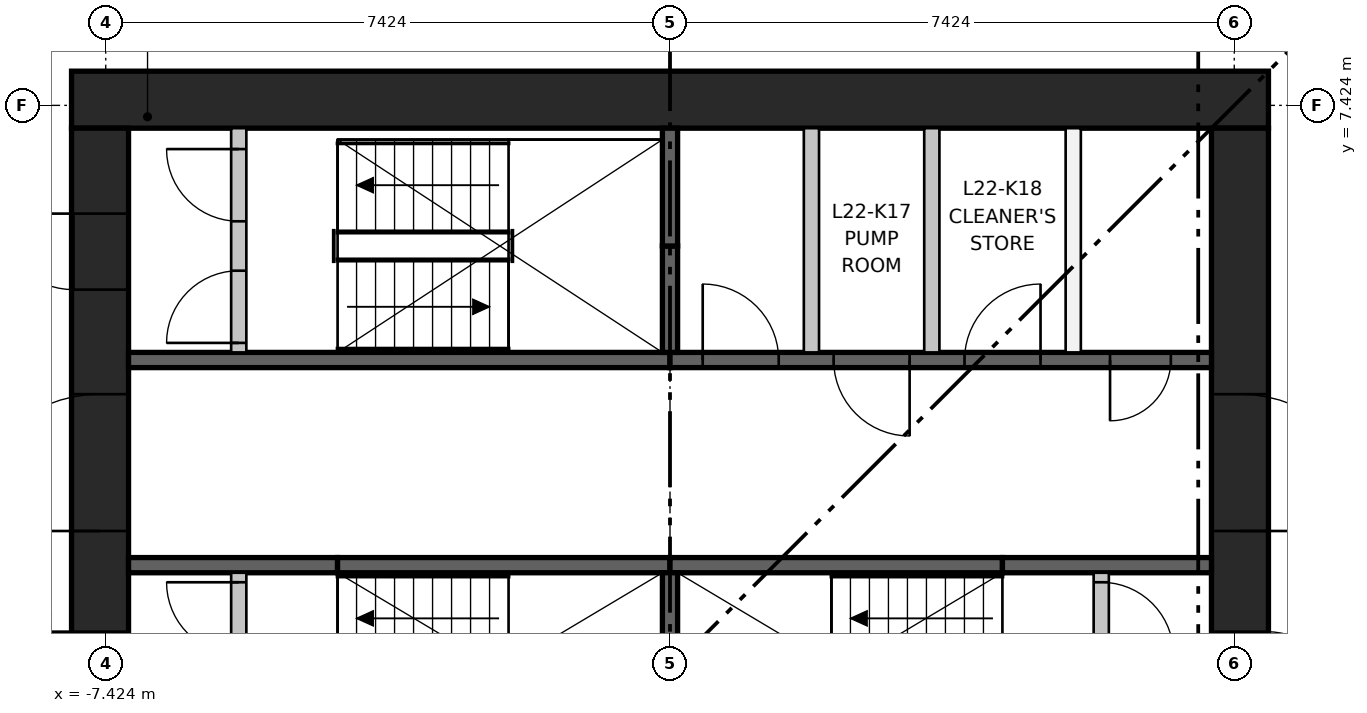
"""IFC4 building model, lengths in metres.
Left out: names, types, materials, properties, quantities, classifications, styles, units other than length and angle.
Written with IfcOpenShell. Run it as: python <this file> out.ifc"""

import sys

from ifc_helpers import new_model, si_unit, direction, frame, frame_2d, origin, place, context, subcontext, project, spatial, rectangle, extrude, element, fill, save


model = new_model("IFC4")
c1 = context("Model", 3, precision=1e-05, world=origin(), true_north=direction((0.0, 1.0)))
c2 = subcontext(c1, "Body", "Model", "MODEL_VIEW")
j1 = project(units=[si_unit("LENGTHUNIT", "METRE"), si_unit("PLANEANGLEUNIT", "RADIAN")], contexts=[c1])
p1 = place(None, origin())
s1 = spatial("IfcSite", under=j1, at=p1, CompositionType="ELEMENT")
p2 = place(p1, origin())
s2 = spatial("IfcBuilding", under=s1, at=p2, CompositionType="ELEMENT")
p3 = place(p2, frame((0.0, 0.0, 87.35)))
s3 = spatial("IfcBuildingStorey", under=s2, at=p3, CompositionType="ELEMENT", Elevation=87.35)
p4 = place(p3, frame((-7.874, 7.499, 0.0), z_axis=(0.0, 0.0, 1.0), x_axis=(1.0, 0.0, 0.0)))
e1 = element("IfcWall", 1, at=p4, inside=s3, PredefinedType="SHEAR", context=c2, shape_type="SweptSolid", body=[
    extrude(rectangle(XDim=15.748, YDim=0.75, at=frame_2d((7.874, 0.0))), origin(), (0.0, 0.0, 1.0), 3.65),
])
p5 = place(p3, frame((-7.499, -7.124, 0.0), z_axis=(0.0, 0.0, 1.0), x_axis=(0.0, 1.0, 0.0)))
e2 = element("IfcWall", 2, at=p5, inside=s3, PredefinedType="SHEAR", context=c2, shape_type="SweptSolid", body=[
    extrude(rectangle(XDim=14.248, YDim=0.75, at=frame_2d((7.124, 0.0))), origin(), (0.0, 0.0, 1.0), 3.65),
])
p6 = place(p5, frame((6.624, 0.0, 0.0)))
e3 = element("IfcOpeningElement", 3, at=p6, cuts=e2, PredefinedType="OPENING", context=c2, shape_type="SweptSolid", body=[
    extrude(rectangle(XDim=1.0, YDim=2.1, at=frame_2d((0.5, 1.05))), frame((0.0, 0.385, 0.0), z_axis=(0.0, -1.0, 0.0), x_axis=(1.0, 0.0, 0.0)), (0.0, 0.0, 1.0), 0.77),
])
p7 = place(p5, frame((3.5, 0.0, 0.0)))
e4 = element("IfcOpeningElement", 4, at=p7, cuts=e2, PredefinedType="OPENING", context=c2, shape_type="SweptSolid", body=[
    extrude(rectangle(XDim=1.8, YDim=2.1, at=frame_2d((0.9, 1.05))), frame((0.0, 0.385, 0.0), z_axis=(0.0, -1.0, 0.0), x_axis=(1.0, 0.0, 0.0)), (0.0, 0.0, 1.0), 0.77),
])
p8 = place(p5, frame((8.948, 0.0, 0.0)))
e5 = element("IfcOpeningElement", 5, at=p8, cuts=e2, PredefinedType="OPENING", context=c2, shape_type="SweptSolid", body=[
    extrude(rectangle(XDim=1.8, YDim=2.1, at=frame_2d((0.9, 1.05))), frame((0.0, 0.385, 0.0), z_axis=(0.0, -1.0, 0.0), x_axis=(1.0, 0.0, 0.0)), (0.0, 0.0, 1.0), 0.77),
])
p9 = place(p5, frame((12.124, 0.0, 0.0)))
e6 = element("IfcOpeningElement", 6, at=p9, cuts=e2, PredefinedType="OPENING", context=c2, shape_type="SweptSolid", body=[
    extrude(rectangle(XDim=1.0, YDim=2.1, at=frame_2d((0.5, 1.05))), frame((0.0, 0.385, 0.0), z_axis=(0.0, -1.0, 0.0), x_axis=(1.0, 0.0, 0.0)), (0.0, 0.0, 1.0), 0.77),
])
p10 = place(p3, frame((7.499, -7.124, 0.0), z_axis=(0.0, 0.0, 1.0), x_axis=(0.0, 1.0, 0.0)))
e7 = element("IfcWall", 7, at=p10, inside=s3, PredefinedType="SHEAR", context=c2, shape_type="SweptSolid", body=[
    extrude(rectangle(XDim=14.248, YDim=0.75, at=frame_2d((7.124, 0.0))), origin(), (0.0, 0.0, 1.0), 3.65),
])
p11 = place(p10, frame((6.624, 0.0, 0.0)))
e8 = element("IfcOpeningElement", 8, at=p11, cuts=e7, PredefinedType="OPENING", context=c2, shape_type="SweptSolid", body=[
    extrude(rectangle(XDim=1.0, YDim=2.1, at=frame_2d((0.5, 1.05))), frame((0.0, 0.385, 0.0), z_axis=(0.0, -1.0, 0.0), x_axis=(1.0, 0.0, 0.0)), (0.0, 0.0, 1.0), 0.77),
])
p12 = place(p10, frame((3.5, 0.0, 0.0)))
e9 = element("IfcOpeningElement", 9, at=p12, cuts=e7, PredefinedType="OPENING", context=c2, shape_type="SweptSolid", body=[
    extrude(rectangle(XDim=1.8, YDim=2.1, at=frame_2d((0.9, 1.05))), frame((0.0, 0.385, 0.0), z_axis=(0.0, -1.0, 0.0), x_axis=(1.0, 0.0, 0.0)), (0.0, 0.0, 1.0), 0.77),
])
p13 = place(p10, frame((8.948, 0.0, 0.0)))
e10 = element("IfcOpeningElement", 10, at=p13, cuts=e7, PredefinedType="OPENING", context=c2, shape_type="SweptSolid", body=[
    extrude(rectangle(XDim=1.8, YDim=2.1, at=frame_2d((0.9, 1.05))), frame((0.0, 0.385, 0.0), z_axis=(0.0, -1.0, 0.0), x_axis=(1.0, 0.0, 0.0)), (0.0, 0.0, 1.0), 0.77),
])
p14 = place(p3, frame((-7.124, 4.074, 0.0), z_axis=(0.0, 0.0, 1.0), x_axis=(1.0, 0.0, 0.0)))
e11 = element("IfcWall", 11, at=p14, inside=s3, PredefinedType="SHEAR", context=c2, shape_type="SweptSolid", body=[
    extrude(rectangle(XDim=7.124, YDim=0.2, at=frame_2d((3.562, 0.0))), origin(), (0.0, 0.0, 1.0), 3.3),
])
p15 = place(p3, frame((0.0, 4.074, 0.0), z_axis=(0.0, 0.0, 1.0), x_axis=(1.0, 0.0, 0.0)))
e12 = element("IfcWall", 12, at=p15, inside=s3, PredefinedType="SHEAR", context=c2, shape_type="SweptSolid", body=[
    extrude(rectangle(XDim=7.124, YDim=0.2, at=frame_2d((3.562, 0.0))), origin(), (0.0, 0.0, 1.0), 3.3),
])
p16 = place(p15, frame((0.43, 0.0, 0.0)))
e13 = element("IfcOpeningElement", 13, at=p16, cuts=e12, PredefinedType="OPENING", context=c2, shape_type="SweptSolid", body=[
    extrude(rectangle(XDim=1.0, YDim=2.1, at=frame_2d((0.5, 1.05))), frame((0.0, 0.11, 0.0), z_axis=(0.0, -1.0, 0.0), x_axis=(1.0, 0.0, 0.0)), (0.0, 0.0, 1.0), 0.22),
])
p17 = place(p15, frame((2.153, 0.0, 0.0)))
e14 = element("IfcOpeningElement", 14, at=p17, cuts=e12, PredefinedType="OPENING", context=c2, shape_type="SweptSolid", body=[
    extrude(rectangle(XDim=1.0, YDim=2.1, at=frame_2d((0.5, 1.05))), frame((0.0, 0.11, 0.0), z_axis=(0.0, -1.0, 0.0), x_axis=(1.0, 0.0, 0.0)), (0.0, 0.0, 1.0), 0.22),
])
p18 = place(p15, frame((3.875, 0.0, 0.0)))
e15 = element("IfcOpeningElement", 15, at=p18, cuts=e12, PredefinedType="OPENING", context=c2, shape_type="SweptSolid", body=[
    extrude(rectangle(XDim=1.0, YDim=2.1, at=frame_2d((0.5, 1.05))), frame((0.0, 0.11, 0.0), z_axis=(0.0, -1.0, 0.0), x_axis=(1.0, 0.0, 0.0)), (0.0, 0.0, 1.0), 0.22),
])
p19 = place(p15, frame((5.79, 0.0, 0.0)))
e16 = element("IfcOpeningElement", 16, at=p19, cuts=e12, PredefinedType="OPENING", context=c2, shape_type="SweptSolid", body=[
    extrude(rectangle(XDim=0.8, YDim=2.1, at=frame_2d((0.4, 1.05))), frame((0.0, 0.11, 0.0), z_axis=(0.0, -1.0, 0.0), x_axis=(1.0, 0.0, 0.0)), (0.0, 0.0, 1.0), 0.22),
])
p20 = place(p3, frame((-7.124, 1.375, 0.0), z_axis=(0.0, 0.0, 1.0), x_axis=(1.0, 0.0, 0.0)))
e17 = element("IfcWall", 17, at=p20, inside=s3, PredefinedType="SHEAR", context=c2, shape_type="SweptSolid", body=[
    extrude(rectangle(XDim=2.75, YDim=0.2, at=frame_2d((1.375, 0.0))), origin(), (0.0, 0.0, 1.0), 3.3),
])
for number, where, z_axis, x_axis in (
    (18, (-4.374, 1.375, 0.0), (0.0, 0.0, 1.0), (1.0, 0.0, 0.0)),
    (19, (0.0, 1.375, 0.0), (0.0, 0.0, 1.0), (1.0, 0.0, 0.0)),
):
    element("IfcWall", number, at=place(p3, frame(where, z_axis=z_axis, x_axis=x_axis)), inside=s3, PredefinedType="SHEAR", context=c2, shape_type="SweptSolid", body=[
        extrude(rectangle(XDim=4.374, YDim=0.2, at=frame_2d((2.187, 0.0))), origin(), (0.0, 0.0, 1.0), 3.3),
    ])
p21 = place(p3, frame((4.374, 1.375, 0.0), z_axis=(0.0, 0.0, 1.0), x_axis=(1.0, 0.0, 0.0)))
e20 = element("IfcWall", 20, at=p21, inside=s3, PredefinedType="SHEAR", context=c2, shape_type="SweptSolid", body=[
    extrude(rectangle(XDim=2.75, YDim=0.2, at=frame_2d((1.375, 0.0))), origin(), (0.0, 0.0, 1.0), 3.3),
])
p22 = place(p3, frame((0.0, -1.275, 0.0), z_axis=(0.0, 0.0, 1.0), x_axis=(0.0, 1.0, 0.0)))
e21 = element("IfcWall", 21, at=p22, inside=s3, PredefinedType="SHEAR", context=c2, shape_type="SweptSolid", body=[
    extrude(rectangle(XDim=2.55, YDim=0.2, at=frame_2d((1.275, 0.0))), origin(), (0.0, 0.0, 1.0), 3.3),
])
p23 = place(p3, frame((0.0, 4.174, 0.0), z_axis=(0.0, 0.0, 1.0), x_axis=(0.0, 1.0, 0.0)))
e22 = element("IfcWall", 22, at=p23, inside=s3, PredefinedType="SHEAR", context=c2, shape_type="SweptSolid", body=[
    extrude(rectangle(XDim=1.4, YDim=0.2, at=frame_2d((0.7, 0.0))), origin(), (0.0, 0.0, 1.0), 3.3),
])
p24 = place(p3, frame((0.0, 5.574, 0.0), z_axis=(0.0, 0.0, 1.0), x_axis=(0.0, 1.0, 0.0)))
e23 = element("IfcWall", 23, at=p24, inside=s3, PredefinedType="SHEAR", context=c2, shape_type="SweptSolid", body=[
    extrude(rectangle(XDim=1.55, YDim=0.2, at=frame_2d((0.775, 0.0))), origin(), (0.0, 0.0, 1.0), 3.3),
])
for number, where, z_axis, x_axis in (
    (24, (1.861, 4.174, 0.0), (0.0, 0.0, 1.0), (0.0, 1.0, 0.0)),
    (25, (3.445, 4.174, 0.0), (0.0, 0.0, 1.0), (0.0, 1.0, 0.0)),
    (26, (5.305, 4.174, 0.0), (0.0, 0.0, 1.0), (0.0, 1.0, 0.0)),
):
    element("IfcWall", number, at=place(p3, frame(where, z_axis=z_axis, x_axis=x_axis)), inside=s3, PredefinedType="PARTITIONING", context=c2, shape_type="SweptSolid", body=[
        extrude(rectangle(XDim=2.95, YDim=0.2, at=frame_2d((1.475, 0.0))), origin(), (0.0, 0.0, 1.0), 3.3),
    ])
p25 = place(p3, frame((-5.674, -1.275, 0.0), z_axis=(0.0, 0.0, 1.0), x_axis=(0.0, 1.0, 0.0)))
e27 = element("IfcWall", 27, at=p25, inside=s3, PredefinedType="PARTITIONING", context=c2, shape_type="SweptSolid", body=[
    extrude(rectangle(XDim=2.55, YDim=0.2, at=frame_2d((1.275, 0.0))), origin(), (0.0, 0.0, 1.0), 3.3),
])
p26 = place(p25, frame((0.125, 0.0, 0.0)))
e28 = element("IfcOpeningElement", 28, at=p26, cuts=e27, PredefinedType="OPENING", context=c2, shape_type="SweptSolid", body=[
    extrude(rectangle(XDim=0.95, YDim=2.1, at=frame_2d((0.475, 1.05))), frame((0.0, 0.11, 0.0), z_axis=(0.0, -1.0, 0.0), x_axis=(1.0, 0.0, 0.0)), (0.0, 0.0, 1.0), 0.22),
])
p27 = place(p25, frame((1.475, 0.0, 0.0)))
e29 = element("IfcOpeningElement", 29, at=p27, cuts=e27, PredefinedType="OPENING", context=c2, shape_type="SweptSolid", body=[
    extrude(rectangle(XDim=0.95, YDim=2.1, at=frame_2d((0.475, 1.05))), frame((0.0, 0.11, 0.0), z_axis=(0.0, -1.0, 0.0), x_axis=(1.0, 0.0, 0.0)), (0.0, 0.0, 1.0), 0.22),
])
p28 = place(p3, frame((5.674, -1.275, 0.0), z_axis=(0.0, 0.0, 1.0), x_axis=(0.0, 1.0, 0.0)))
e30 = element("IfcWall", 30, at=p28, inside=s3, PredefinedType="PARTITIONING", context=c2, shape_type="SweptSolid", body=[
    extrude(rectangle(XDim=2.55, YDim=0.2, at=frame_2d((1.275, 0.0))), origin(), (0.0, 0.0, 1.0), 3.3),
])
p29 = place(p28, frame((0.125, 0.0, 0.0)))
e31 = element("IfcOpeningElement", 31, at=p29, cuts=e30, PredefinedType="OPENING", context=c2, shape_type="SweptSolid", body=[
    extrude(rectangle(XDim=0.95, YDim=2.1, at=frame_2d((0.475, 1.05))), frame((0.0, 0.11, 0.0), z_axis=(0.0, -1.0, 0.0), x_axis=(1.0, 0.0, 0.0)), (0.0, 0.0, 1.0), 0.22),
])
p30 = place(p28, frame((1.475, 0.0, 0.0)))
e32 = element("IfcOpeningElement", 32, at=p30, cuts=e30, PredefinedType="OPENING", context=c2, shape_type="SweptSolid", body=[
    extrude(rectangle(XDim=0.95, YDim=2.1, at=frame_2d((0.475, 1.05))), frame((0.0, 0.11, 0.0), z_axis=(0.0, -1.0, 0.0), x_axis=(1.0, 0.0, 0.0)), (0.0, 0.0, 1.0), 0.22),
])
p31 = place(p3, frame((-5.674, 4.174, 0.0), z_axis=(0.0, 0.0, 1.0), x_axis=(0.0, 1.0, 0.0)))
e33 = element("IfcWall", 33, at=p31, inside=s3, PredefinedType="PARTITIONING", context=c2, shape_type="SweptSolid", body=[
    extrude(rectangle(XDim=2.95, YDim=0.2, at=frame_2d((1.475, 0.0))), origin(), (0.0, 0.0, 1.0), 3.3),
])
p32 = place(p31, frame((0.125, 0.0, 0.0)))
e34 = element("IfcOpeningElement", 34, at=p32, cuts=e33, PredefinedType="OPENING", context=c2, shape_type="SweptSolid", body=[
    extrude(rectangle(XDim=0.95, YDim=2.1, at=frame_2d((0.475, 1.05))), frame((0.0, 0.11, 0.0), z_axis=(0.0, -1.0, 0.0), x_axis=(1.0, 0.0, 0.0)), (0.0, 0.0, 1.0), 0.22),
])
p33 = place(p31, frame((1.725, 0.0, 0.0)))
e35 = element("IfcOpeningElement", 35, at=p33, cuts=e33, PredefinedType="OPENING", context=c2, shape_type="SweptSolid", body=[
    extrude(rectangle(XDim=0.95, YDim=2.1, at=frame_2d((0.475, 1.05))), frame((0.0, 0.11, 0.0), z_axis=(0.0, -1.0, 0.0), x_axis=(1.0, 0.0, 0.0)), (0.0, 0.0, 1.0), 0.22),
])
p34 = place(p27, origin())
e36 = element("IfcDoor", 36, at=p34, inside=s3, OperationType="SINGLE_SWING_RIGHT", PredefinedType="DOOR", context=c2, shape_type="SweptSolid", body=[
    extrude(rectangle(XDim=0.95, YDim=2.1, at=frame_2d((0.475, 1.05))), frame((0.0, 0.025, 0.0), z_axis=(0.0, -1.0, 0.0), x_axis=(1.0, 0.0, 0.0)), (0.0, 0.0, 1.0), 0.05),
])
fill(e29, e36)
p35 = place(p30, frame((0.95, 0.0, 0.0), z_axis=(0.0, 0.0, 1.0), x_axis=(-1.0, 0.0, 0.0)))
e37 = element("IfcDoor", 37, at=p35, inside=s3, OperationType="SINGLE_SWING_LEFT", PredefinedType="DOOR", context=c2, shape_type="SweptSolid", body=[
    extrude(rectangle(XDim=0.95, YDim=2.1, at=frame_2d((0.475, 1.05))), frame((0.0, 0.025, 0.0), z_axis=(0.0, -1.0, 0.0), x_axis=(1.0, 0.0, 0.0)), (0.0, 0.0, 1.0), 0.05),
])
fill(e32, e37)
p36 = place(p32, origin())
e38 = element("IfcDoor", 38, at=p36, inside=s3, OperationType="SINGLE_SWING_LEFT", PredefinedType="DOOR", context=c2, shape_type="SweptSolid", body=[
    extrude(rectangle(XDim=0.95, YDim=2.1, at=frame_2d((0.475, 1.05))), frame((0.0, 0.025, 0.0), z_axis=(0.0, -1.0, 0.0), x_axis=(1.0, 0.0, 0.0)), (0.0, 0.0, 1.0), 0.05),
])
fill(e34, e38)
p37 = place(p33, origin())
e39 = element("IfcDoor", 39, at=p37, inside=s3, OperationType="SINGLE_SWING_RIGHT", PredefinedType="DOOR", context=c2, shape_type="SweptSolid", body=[
    extrude(rectangle(XDim=0.95, YDim=2.1, at=frame_2d((0.475, 1.05))), frame((0.0, 0.025, 0.0), z_axis=(0.0, -1.0, 0.0), x_axis=(1.0, 0.0, 0.0)), (0.0, 0.0, 1.0), 0.05),
])
fill(e35, e39)
p38 = place(p16, origin())
e40 = element("IfcDoor", 40, at=p38, inside=s3, OperationType="SINGLE_SWING_LEFT", PredefinedType="DOOR", context=c2, shape_type="SweptSolid", body=[
    extrude(rectangle(XDim=1.0, YDim=2.1, at=frame_2d((0.5, 1.05))), frame((0.0, 0.025, 0.0), z_axis=(0.0, -1.0, 0.0), x_axis=(1.0, 0.0, 0.0)), (0.0, 0.0, 1.0), 0.05),
])
fill(e13, e40)
p39 = place(p17, frame((1.0, 0.0, 0.0), z_axis=(0.0, 0.0, 1.0), x_axis=(-1.0, 0.0, 0.0)))
e41 = element("IfcDoor", 41, at=p39, inside=s3, OperationType="SINGLE_SWING_RIGHT", PredefinedType="DOOR", context=c2, shape_type="SweptSolid", body=[
    extrude(rectangle(XDim=1.0, YDim=2.1, at=frame_2d((0.5, 1.05))), frame((0.0, 0.025, 0.0), z_axis=(0.0, -1.0, 0.0), x_axis=(1.0, 0.0, 0.0)), (0.0, 0.0, 1.0), 0.05),
])
fill(e14, e41)
p40 = place(p18, origin())
e42 = element("IfcDoor", 42, at=p40, inside=s3, OperationType="SINGLE_SWING_RIGHT", PredefinedType="DOOR", context=c2, shape_type="SweptSolid", body=[
    extrude(rectangle(XDim=1.0, YDim=2.1, at=frame_2d((0.5, 1.05))), frame((0.0, 0.025, 0.0), z_axis=(0.0, -1.0, 0.0), x_axis=(1.0, 0.0, 0.0)), (0.0, 0.0, 1.0), 0.05),
])
fill(e15, e42)
p41 = place(p19, frame((0.8, 0.0, 0.0), z_axis=(0.0, 0.0, 1.0), x_axis=(-1.0, 0.0, 0.0)))
e43 = element("IfcDoor", 43, at=p41, inside=s3, OperationType="SINGLE_SWING_LEFT", PredefinedType="DOOR", context=c2, shape_type="SweptSolid", body=[
    extrude(rectangle(XDim=0.8, YDim=2.1, at=frame_2d((0.4, 1.05))), frame((0.0, 0.025, 0.0), z_axis=(0.0, -1.0, 0.0), x_axis=(1.0, 0.0, 0.0)), (0.0, 0.0, 1.0), 0.05),
])
fill(e16, e43)
p42 = place(p6, origin())
e44 = element("IfcDoor", 44, at=p42, inside=s3, OperationType="SINGLE_SWING_RIGHT", PredefinedType="DOOR", context=c2, shape_type="SweptSolid", body=[
    extrude(rectangle(XDim=1.0, YDim=2.1, at=frame_2d((0.5, 1.05))), frame((0.0, 0.375, 0.0), z_axis=(0.0, -1.0, 0.0), x_axis=(1.0, 0.0, 0.0)), (0.0, 0.0, 1.0), 0.05),
])
fill(e3, e44)
p43 = place(p8, origin())
e45 = element("IfcDoor", 45, at=p43, inside=s3, OperationType="DOUBLE_DOOR_SINGLE_SWING", PredefinedType="DOOR", context=c2, shape_type="SweptSolid", body=[
    extrude(rectangle(XDim=1.8, YDim=2.1, at=frame_2d((0.9, 1.05))), frame((0.0, 0.025, 0.0), z_axis=(0.0, -1.0, 0.0), x_axis=(1.0, 0.0, 0.0)), (0.0, 0.0, 1.0), 0.05),
])
fill(e5, e45)
p44 = place(p9, origin())
e46 = element("IfcDoor", 46, at=p44, inside=s3, OperationType="SINGLE_SWING_RIGHT", PredefinedType="DOOR", context=c2, shape_type="SweptSolid", body=[
    extrude(rectangle(XDim=1.0, YDim=2.1, at=frame_2d((0.5, 1.05))), frame((0.0, 0.375, 0.0), z_axis=(0.0, -1.0, 0.0), x_axis=(1.0, 0.0, 0.0)), (0.0, 0.0, 1.0), 0.05),
])
fill(e6, e46)
p45 = place(p11, frame((1.0, 0.0, 0.0), z_axis=(0.0, 0.0, 1.0), x_axis=(-1.0, 0.0, 0.0)))
e47 = element("IfcDoor", 47, at=p45, inside=s3, OperationType="SINGLE_SWING_LEFT", PredefinedType="DOOR", context=c2, shape_type="SweptSolid", body=[
    extrude(rectangle(XDim=1.0, YDim=2.1, at=frame_2d((0.5, 1.05))), frame((0.0, 0.375, 0.0), z_axis=(0.0, -1.0, 0.0), x_axis=(1.0, 0.0, 0.0)), (0.0, 0.0, 1.0), 0.05),
])
fill(e8, e47)
p46 = place(p13, frame((1.8, 0.0, 0.0), z_axis=(0.0, 0.0, 1.0), x_axis=(-1.0, 0.0, 0.0)))
e48 = element("IfcDoor", 48, at=p46, inside=s3, OperationType="DOUBLE_DOOR_SINGLE_SWING", PredefinedType="DOOR", context=c2, shape_type="SweptSolid", body=[
    extrude(rectangle(XDim=1.8, YDim=2.1, at=frame_2d((0.9, 1.05))), frame((0.0, 0.025, 0.0), z_axis=(0.0, -1.0, 0.0), x_axis=(1.0, 0.0, 0.0)), (0.0, 0.0, 1.0), 0.05),
])
fill(e10, e48)
save(model, sys.argv[1])
